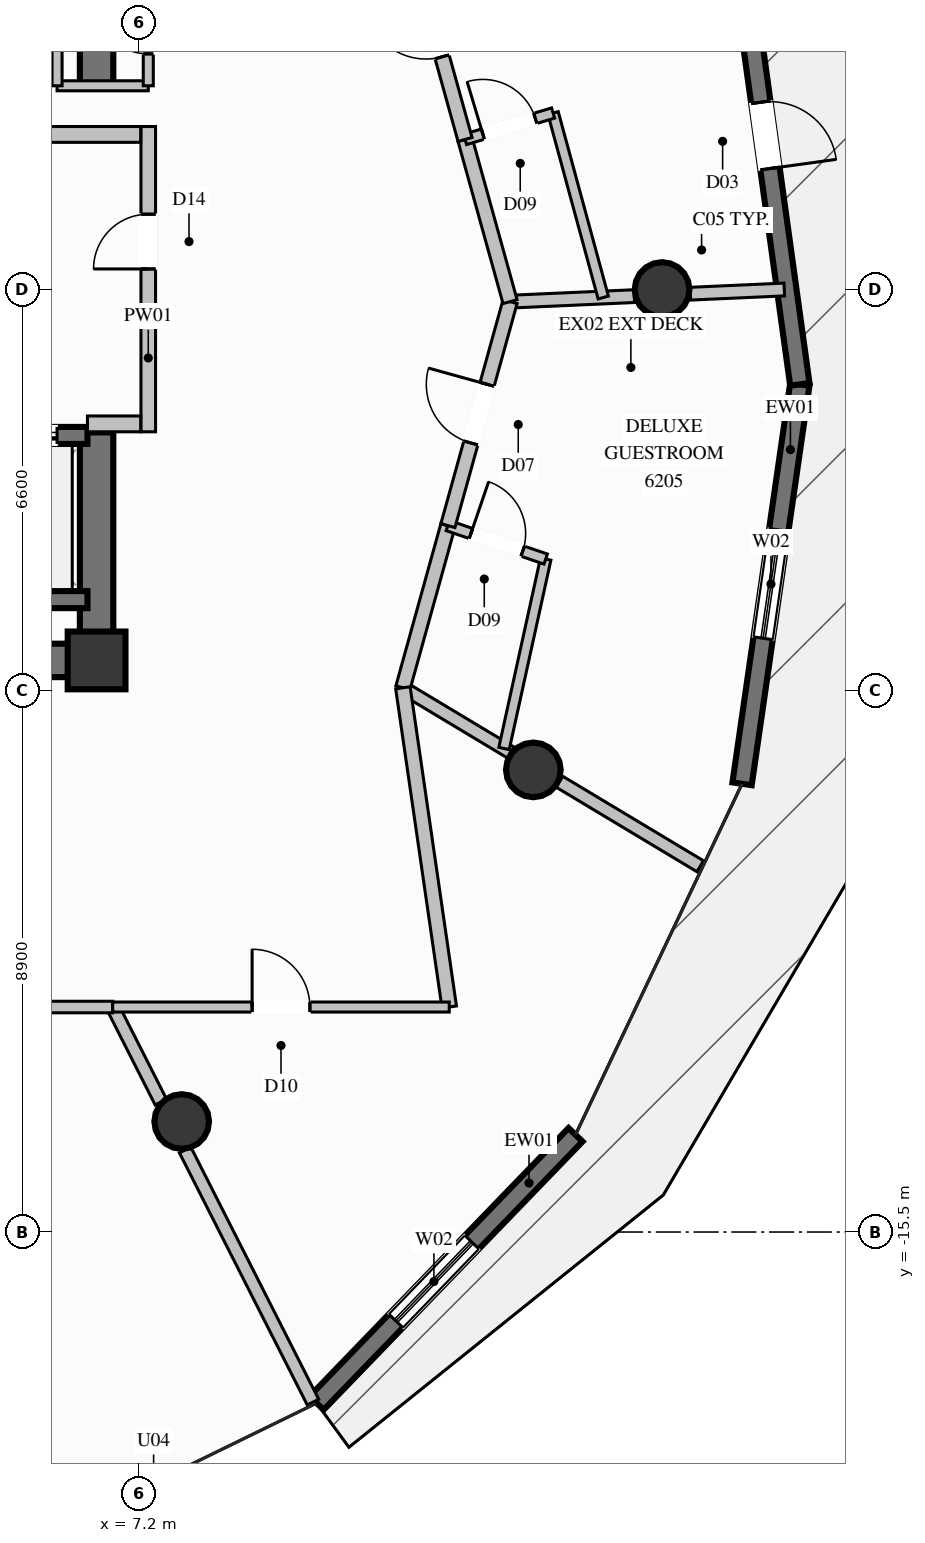
"""IFC4 building model, lengths in metres.
Left out: names, types, materials, properties, quantities, classifications, styles, units other than length and angle.
Written with IfcOpenShell. Run it as: python <this file> out.ifc"""

import sys

from ifc_helpers import new_model, si_unit, direction, frame, frame_2d, origin, origin_2d, place, context, subcontext, project, spatial, rectangle, circle, extrude, element, fill, save


model = new_model("IFC4")
c1 = context("Model", 3, precision=1e-05, world=origin(), true_north=direction((0.0, 1.0)))
c2 = subcontext(c1, "Body", "Model", "MODEL_VIEW")
j1 = project(units=[si_unit("LENGTHUNIT", "METRE"), si_unit("PLANEANGLEUNIT", "RADIAN")], contexts=[c1])
p1 = place(None, origin())
s1 = spatial("IfcSite", under=j1, at=p1, CompositionType="ELEMENT")
p2 = place(p1, origin())
s2 = spatial("IfcBuilding", under=s1, at=p2, CompositionType="ELEMENT")
p3 = place(p2, frame((0.0, 0.0, 230.8)))
s3 = spatial("IfcBuildingStorey", under=s2, at=p3, CompositionType="ELEMENT", Elevation=230.8)
p4 = place(p3, frame((6.5, -6.1, 0.0), z_axis=(0.0, 0.0, 1.0), x_axis=(1.0, 0.0, 0.0)))
e1 = element("IfcColumn", 1, at=p4, inside=s3, PredefinedType="COLUMN", context=c2, shape_type="SweptSolid", body=[
    extrude(rectangle(XDim=0.95, YDim=0.95, at=origin_2d()), origin(), (0.0, 0.0, 1.0), 3.6),
])
p5 = place(p3, frame((4.15, -6.1, 0.0), z_axis=(0.0, 0.0, 1.0), x_axis=(1.0, 0.0, 0.0)))
e2 = element("IfcWall", 2, at=p5, inside=s3, PredefinedType="SHEAR", context=c2, shape_type="SweptSolid", body=[
    extrude(rectangle(XDim=2.075, YDim=0.55, at=frame_2d((1.038, 0.0))), origin(), (0.0, 0.0, 1.0), 3.6),
])
p6 = place(p3, frame((6.5, -6.375, 0.0), z_axis=(0.0, 0.0, 1.0), x_axis=(0.0, 1.0, 0.0)))
e3 = element("IfcWall", 3, at=p6, inside=s3, PredefinedType="SHEAR", context=c2, shape_type="SweptSolid", body=[
    extrude(rectangle(XDim=4.025, YDim=0.55, at=frame_2d((2.012, 0.0))), origin(), (0.0, 0.0, 1.0), 3.6),
])
p7 = place(p3, frame((6.5, 3.35, 0.0), z_axis=(0.0, 0.0, 1.0), x_axis=(0.0, 1.0, 0.0)))
e4 = element("IfcWall", 4, at=p7, inside=s3, PredefinedType="SHEAR", context=c2, shape_type="SweptSolid", body=[
    extrude(rectangle(XDim=3.025, YDim=0.55, at=frame_2d((1.512, 0.0))), origin(), (0.0, 0.0, 1.0), 3.6),
])
for number, where, z_axis, x_axis in (
    (5, (15.8, 0.0, 0.0), (0.0, 0.0, 1.0), (1.0, 0.0, 0.0)),
    (6, (7.9, -13.683, 0.0), (0.0, 0.0, 1.0), (1.0, 0.0, 0.0)),
    (7, (13.683, -7.9, 0.0), (0.0, 0.0, 1.0), (1.0, 0.0, 0.0)),
):
    element("IfcColumn", number, at=place(p3, frame(where, z_axis=z_axis, x_axis=x_axis)), inside=s3, PredefinedType="COLUMN", context=c2, shape_type="SweptSolid", body=[
        extrude(circle(Radius=0.45, at=origin_2d()), origin(), (0.0, 0.0, 1.0), 3.6),
    ])
p8 = place(p3, frame((14.377, -13.901, 0.0), z_axis=(0.0, 0.0, 1.0), x_axis=(-0.694433198018, -0.71955717875, 0.0)))
e8 = element("IfcWall", 8, at=p8, inside=s3, PredefinedType="SOLIDWALL", context=c2, shape_type="SweptSolid", body=[
    extrude(rectangle(XDim=6.132, YDim=0.32, at=frame_2d((3.066, 0.0))), origin(), (0.0, 0.0, 1.0), 3.2),
])
p9 = place(p8, frame((2.454, 0.0, 0.35)))
e9 = element("IfcOpeningElement", 9, at=p9, cuts=e8, PredefinedType="OPENING", context=c2, shape_type="SweptSolid", body=[
    extrude(rectangle(XDim=1.8, YDim=2.6, at=frame_2d((0.9, 1.3))), frame((0.0, 0.17, 0.0), z_axis=(0.0, -1.0, 0.0), x_axis=(1.0, 0.0, 0.0)), (0.0, 0.0, 1.0), 0.34),
])
p10 = place(p3, frame((18.066, -1.56, 0.0), z_axis=(0.0, 0.0, 1.0), x_axis=(-0.143125707186, -0.989704517491, 0.0)))
e10 = element("IfcWall", 10, at=p10, inside=s3, PredefinedType="SOLIDWALL", context=c2, shape_type="SweptSolid", body=[
    extrude(rectangle(XDim=6.637, YDim=0.32, at=frame_2d((3.319, 0.0))), origin(), (0.0, 0.0, 1.0), 3.2),
])
p11 = place(p10, frame((2.419, 0.0, 0.35)))
e11 = element("IfcOpeningElement", 11, at=p11, cuts=e10, PredefinedType="OPENING", context=c2, shape_type="SweptSolid", body=[
    extrude(rectangle(XDim=1.8, YDim=2.6, at=frame_2d((0.9, 1.3))), frame((0.0, 0.17, 0.0), z_axis=(0.0, -1.0, 0.0), x_axis=(1.0, 0.0, 0.0)), (0.0, 0.0, 1.0), 0.34),
])
p12 = place(p3, frame((17.136, 5.161, 0.0), z_axis=(0.0, 0.0, 1.0), x_axis=(0.137057460959, -0.990563098644, 0.0)))
e12 = element("IfcWall", 12, at=p12, inside=s3, PredefinedType="SOLIDWALL", context=c2, shape_type="SweptSolid", body=[
    extrude(rectangle(XDim=6.785, YDim=0.32, at=frame_2d((3.393, 0.0))), origin(), (0.0, 0.0, 1.0), 3.2),
])
p13 = place(p12, frame((2.102, 0.0, 0.0)))
e13 = element("IfcOpeningElement", 13, at=p13, cuts=e12, PredefinedType="OPENING", context=c2, shape_type="SweptSolid", body=[
    extrude(rectangle(XDim=1.1, YDim=2.2, at=frame_2d((0.55, 1.1))), frame((0.0, 0.17, 0.0), z_axis=(0.0, -1.0, 0.0), x_axis=(1.0, 0.0, 0.0)), (0.0, 0.0, 1.0), 0.34),
])
p14 = place(p3, frame((4.15, -5.1, 0.0), z_axis=(0.0, 0.0, 1.0), x_axis=(1.0, 0.0, 0.0)))
e14 = element("IfcWall", 14, at=p14, inside=s3, PredefinedType="SOLIDWALL", context=c2, shape_type="SweptSolid", body=[
    extrude(rectangle(XDim=2.2, YDim=0.28, at=frame_2d((1.1, 0.0))), origin(), (0.0, 0.0, 1.0), 3.2),
])
p15 = place(p3, frame((6.35, -2.4, 0.0), z_axis=(0.0, 0.0, 1.0), x_axis=(-1.0, 0.0, 0.0)))
e15 = element("IfcWall", 15, at=p15, inside=s3, PredefinedType="SOLIDWALL", context=c2, shape_type="SweptSolid", body=[
    extrude(rectangle(XDim=2.2, YDim=0.28, at=frame_2d((1.1, 0.0))), origin(), (0.0, 0.0, 1.0), 3.2),
])
p16 = place(p15, frame((0.5, 0.0, 0.0)))
e16 = element("IfcOpeningElement", 16, at=p16, cuts=e15, PredefinedType="OPENING", context=c2, shape_type="SweptSolid", body=[
    extrude(rectangle(XDim=1.2, YDim=2.2, at=frame_2d((0.6, 1.1))), frame((0.0, 0.15, 0.0), z_axis=(0.0, -1.0, 0.0), x_axis=(1.0, 0.0, 0.0)), (0.0, 0.0, 1.0), 0.3),
])
p17 = place(p3, frame((7.35, -2.34, 0.0), z_axis=(0.0, 0.0, 1.0), x_axis=(0.0, 1.0, 0.0)))
e17 = element("IfcWall", 17, at=p17, inside=s3, PredefinedType="PARTITIONING", context=c2, shape_type="SweptSolid", body=[
    extrude(rectangle(XDim=5.02, YDim=0.24, at=frame_2d((2.51, 0.0))), origin(), (0.0, 0.0, 1.0), 3.2),
])
p18 = place(p17, frame((2.678, 0.0, 0.0)))
e18 = element("IfcOpeningElement", 18, at=p18, cuts=e17, PredefinedType="OPENING", context=c2, shape_type="SweptSolid", body=[
    extrude(rectangle(XDim=0.9, YDim=2.02, at=frame_2d((0.45, 1.01))), frame((0.0, 0.13, 0.0), z_axis=(0.0, -1.0, 0.0), x_axis=(1.0, 0.0, 0.0)), (0.0, 0.0, 1.0), 0.26),
])
p19 = place(p3, frame((6.35, -2.21, 0.0), z_axis=(0.0, 0.0, 1.0), x_axis=(1.0, 0.0, 0.0)))
e19 = element("IfcWall", 19, at=p19, inside=s3, PredefinedType="PARTITIONING", context=c2, shape_type="SweptSolid", body=[
    extrude(rectangle(XDim=0.875, YDim=0.26, at=frame_2d((0.438, 0.0))), origin(), (0.0, 0.0, 1.0), 3.2),
])
p20 = place(p3, frame((4.13, 2.55, 0.0), z_axis=(0.0, 0.0, 1.0), x_axis=(1.0, 0.0, 0.0)))
e20 = element("IfcWall", 20, at=p20, inside=s3, PredefinedType="PARTITIONING", context=c2, shape_type="SweptSolid", body=[
    extrude(rectangle(XDim=3.095, YDim=0.26, at=frame_2d((1.548, 0.0))), origin(), (0.0, 0.0, 1.0), 3.2),
])
p21 = place(p3, frame((5.85, 3.35, 0.0), z_axis=(0.0, 0.0, 1.0), x_axis=(1.0, 0.0, 0.0)))
e21 = element("IfcWall", 21, at=p21, inside=s3, PredefinedType="PARTITIONING", context=c2, shape_type="SweptSolid", body=[
    extrude(rectangle(XDim=1.5, YDim=0.165, at=frame_2d((0.75, 0.0))), origin(), (0.0, 0.0, 1.0), 3.2),
])
p22 = place(p3, frame((7.35, 3.35, 0.0), z_axis=(0.0, 0.0, 1.0), x_axis=(0.0, 1.0, 0.0)))
e22 = element("IfcWall", 22, at=p22, inside=s3, PredefinedType="PARTITIONING", context=c2, shape_type="SweptSolid", body=[
    extrude(rectangle(XDim=1.95, YDim=0.165, at=frame_2d((0.975, 0.0))), origin(), (0.0, 0.0, 1.0), 3.2),
])
p23 = place(p22, frame((0.525, 0.0, 0.0)))
e23 = element("IfcOpeningElement", 23, at=p23, cuts=e22, PredefinedType="OPENING", context=c2, shape_type="SweptSolid", body=[
    extrude(rectangle(XDim=0.9, YDim=2.02, at=frame_2d((0.45, 1.01))), frame((0.0, 0.093, 0.0), z_axis=(0.0, -1.0, 0.0), x_axis=(1.0, 0.0, 0.0)), (0.0, 0.0, 1.0), 0.185),
])
p24 = place(p3, frame((5.85, 5.3, 0.0), z_axis=(0.0, 0.0, 1.0), x_axis=(0.0, -1.0, 0.0)))
e24 = element("IfcWall", 24, at=p24, inside=s3, PredefinedType="PARTITIONING", context=c2, shape_type="SweptSolid", body=[
    extrude(rectangle(XDim=1.95, YDim=0.165, at=frame_2d((0.975, 0.0))), origin(), (0.0, 0.0, 1.0), 2.067),
])
p25 = place(p3, frame((13.3, -0.2, 0.0), z_axis=(0.0, 0.0, 1.0), x_axis=(0.99900803182, 0.044530353235, 0.0)))
e25 = element("IfcWall", 25, at=p25, inside=s3, PredefinedType="PARTITIONING", context=c2, shape_type="SweptSolid", body=[
    extrude(rectangle(XDim=2.045, YDim=0.21, at=frame_2d((1.022, 0.0))), origin(), (0.0, 0.0, 1.0), 2.067),
])
p26 = place(p3, frame((16.265, -0.069, 0.0), z_axis=(0.0, 0.0, 1.0), x_axis=(0.99900178974, 0.04467017009, 0.0)))
e26 = element("IfcWall", 26, at=p26, inside=s3, PredefinedType="PARTITIONING", context=c2, shape_type="SweptSolid", body=[
    extrude(rectangle(XDim=1.547, YDim=0.21, at=frame_2d((0.773, 0.0))), origin(), (0.0, 0.0, 1.0), 3.2),
])
p27 = place(p3, frame((11.538, -6.55, 0.0), z_axis=(0.0, 0.0, 1.0), x_axis=(0.857326120852, -0.514773661432, 0.0)))
e27 = element("IfcWall", 27, at=p27, inside=s3, PredefinedType="PARTITIONING", context=c2, shape_type="SweptSolid", body=[
    extrude(rectangle(XDim=2.067, YDim=0.21, at=frame_2d((1.033, 0.0))), origin(), (0.0, 0.0, 1.0), 2.067),
])
p28 = place(p3, frame((14.111, -8.094, 0.0), z_axis=(0.0, 0.0, 1.0), x_axis=(0.857333459741, -0.514761438736, 0.0)))
e28 = element("IfcWall", 28, at=p28, inside=s3, PredefinedType="PARTITIONING", context=c2, shape_type="SweptSolid", body=[
    extrude(rectangle(XDim=2.702, YDim=0.21, at=frame_2d((1.351, 0.0))), origin(), (0.0, 0.0, 1.0), 3.2),
])
p29 = place(p3, frame((11.538, -6.55, 0.0), z_axis=(0.0, 0.0, 1.0), x_axis=(0.267361785392, 0.963596220266, 0.0)))
e29 = element("IfcWall", 29, at=p29, inside=s3, PredefinedType="PARTITIONING", context=c2, shape_type="SweptSolid", body=[
    extrude(rectangle(XDim=2.768, YDim=0.24, at=frame_2d((1.384, 0.0))), origin(), (0.0, 0.0, 1.0), 3.2),
])
p30 = place(p3, frame((13.201, -7.548, 0.0), z_axis=(0.0, 0.0, 1.0), x_axis=(0.214790229416, 0.976660205674, 0.0)))
e30 = element("IfcWall", 30, at=p30, inside=s3, PredefinedType="PLUMBINGWALL", context=c2, shape_type="SweptSolid", body=[
    extrude(rectangle(XDim=3.189, YDim=0.175, at=frame_2d((1.595, 0.0))), origin(), (0.0, 0.0, 1.0), 2.769),
])
p31 = place(p3, frame((12.278, -3.883, 0.0), z_axis=(0.0, 0.0, 1.0), x_axis=(0.946168616294, -0.323674140982, 0.0)))
e31 = element("IfcWall", 31, at=p31, inside=s3, PredefinedType="PLUMBINGWALL", context=c2, shape_type="SweptSolid", body=[
    extrude(rectangle(XDim=1.699, YDim=0.175, at=frame_2d((0.85, 0.0))), origin(), (0.0, 0.0, 1.0), 3.2),
])
p32 = place(p31, frame((0.4, 0.0, 0.0)))
e32 = element("IfcOpeningElement", 32, at=p32, cuts=e31, PredefinedType="OPENING", context=c2, shape_type="SweptSolid", body=[
    extrude(rectangle(XDim=0.9, YDim=2.1, at=frame_2d((0.45, 1.05))), frame((0.0, 0.098, 0.0), z_axis=(0.0, -1.0, 0.0), x_axis=(1.0, 0.0, 0.0)), (0.0, 0.0, 1.0), 0.195),
])
p33 = place(p3, frame((12.278, -3.883, 0.0), z_axis=(0.0, 0.0, 1.0), x_axis=(0.267373718537, 0.963592909187, 0.0)))
e33 = element("IfcWall", 33, at=p33, inside=s3, PredefinedType="PARTITIONING", context=c2, shape_type="SweptSolid", body=[
    extrude(rectangle(XDim=3.822, YDim=0.24, at=frame_2d((1.911, 0.0))), origin(), (0.0, 0.0, 1.0), 3.2),
])
p34 = place(p33, frame((1.411, 0.0, 0.0)))
e34 = element("IfcOpeningElement", 34, at=p34, cuts=e33, PredefinedType="OPENING", context=c2, shape_type="SweptSolid", body=[
    extrude(rectangle(XDim=1.0, YDim=2.2, at=frame_2d((0.5, 1.1))), frame((0.0, 0.13, 0.0), z_axis=(0.0, -1.0, 0.0), x_axis=(1.0, 0.0, 0.0)), (0.0, 0.0, 1.0), 0.26),
])
p35 = place(p3, frame((13.3, -0.2, 0.0), z_axis=(0.0, 0.0, 1.0), x_axis=(-0.267361785392, 0.963596220266, 0.0)))
e35 = element("IfcWall", 35, at=p35, inside=s3, PredefinedType="PARTITIONING", context=c2, shape_type="SweptSolid", body=[
    extrude(rectangle(XDim=2.768, YDim=0.24, at=frame_2d((1.384, 0.0))), origin(), (0.0, 0.0, 1.0), 3.2),
])
p36 = place(p3, frame((14.833, -0.132, 0.0), z_axis=(0.0, 0.0, 1.0), x_axis=(-0.262361781469, 0.964969582746, 0.0)))
e36 = element("IfcWall", 36, at=p36, inside=s3, PredefinedType="PLUMBINGWALL", context=c2, shape_type="SweptSolid", body=[
    extrude(rectangle(XDim=3.144, YDim=0.175, at=frame_2d((1.572, 0.0))), origin(), (0.0, 0.0, 1.0), 3.2),
])
p37 = place(p3, frame((12.56, 2.467, 0.0), z_axis=(0.0, 0.0, 1.0), x_axis=(0.957706206775, 0.287747843614, 0.0)))
e37 = element("IfcWall", 37, at=p37, inside=s3, PredefinedType="PLUMBINGWALL", context=c2, shape_type="SweptSolid", body=[
    extrude(rectangle(XDim=1.512, YDim=0.175, at=frame_2d((0.756, 0.0))), origin(), (0.0, 0.0, 1.0), 3.2),
])
p38 = place(p37, frame((0.306, 0.0, 0.0)))
e38 = element("IfcOpeningElement", 38, at=p38, cuts=e37, PredefinedType="OPENING", context=c2, shape_type="SweptSolid", body=[
    extrude(rectangle(XDim=0.9, YDim=2.1, at=frame_2d((0.45, 1.05))), frame((0.0, 0.098, 0.0), z_axis=(0.0, -1.0, 0.0), x_axis=(1.0, 0.0, 0.0)), (0.0, 0.0, 1.0), 0.195),
])
p39 = place(p3, frame((12.56, 2.467, 0.0), z_axis=(0.0, 0.0, 1.0), x_axis=(-0.267390175797, 0.963588342544, 0.0)))
e39 = element("IfcWall", 39, at=p39, inside=s3, PredefinedType="PARTITIONING", context=c2, shape_type="SweptSolid", body=[
    extrude(rectangle(XDim=3.822, YDim=0.24, at=frame_2d((1.911, 0.0))), origin(), (0.0, 0.0, 1.0), 3.2),
])
p40 = place(p39, frame((1.411, 0.0, 0.0)))
e40 = element("IfcOpeningElement", 40, at=p40, cuts=e39, PredefinedType="OPENING", context=c2, shape_type="SweptSolid", body=[
    extrude(rectangle(XDim=1.0, YDim=2.2, at=frame_2d((0.5, 1.1))), frame((0.0, 0.13, 0.0), z_axis=(0.0, -1.0, 0.0), x_axis=(1.0, 0.0, 0.0)), (0.0, 0.0, 1.0), 0.26),
])
p41 = place(p3, frame((6.765, -11.8, 0.0), z_axis=(0.0, 0.0, 1.0), x_axis=(0.452225083285, -0.891903847983, 0.0)))
e41 = element("IfcWall", 41, at=p41, inside=s3, PredefinedType="PARTITIONING", context=c2, shape_type="SweptSolid", body=[
    extrude(rectangle(XDim=1.751, YDim=0.21, at=frame_2d((0.875, 0.0))), origin(), (0.0, 0.0, 1.0), 2.067),
])
p42 = place(p3, frame((7.956, -14.15, 0.0), z_axis=(0.0, 0.0, 1.0), x_axis=(0.45218310231, -0.8919251325, 0.0)))
e42 = element("IfcWall", 42, at=p42, inside=s3, PredefinedType="PARTITIONING", context=c2, shape_type="SweptSolid", body=[
    extrude(rectangle(XDim=4.651, YDim=0.21, at=frame_2d((2.325, 0.0))), origin(), (0.0, 0.0, 1.0), 3.2),
])
p43 = place(p3, frame((0.0, -11.8, 0.0), z_axis=(0.0, 0.0, 1.0), x_axis=(1.0, 0.0, 0.0)))
e43 = element("IfcWall", 43, at=p43, inside=s3, PredefinedType="PARTITIONING", context=c2, shape_type="SweptSolid", body=[
    extrude(rectangle(XDim=6.765, YDim=0.19, at=frame_2d((3.382, 0.0))), origin(), (0.0, 0.0, 1.0), 3.2),
])
p44 = place(p43, frame((2.907, 0.0, 0.0)))
e44 = element("IfcOpeningElement", 44, at=p44, cuts=e43, PredefinedType="OPENING", context=c2, shape_type="SweptSolid", body=[
    extrude(rectangle(XDim=0.95, YDim=2.1, at=frame_2d((0.475, 1.05))), frame((0.0, 0.105, 0.0), z_axis=(0.0, -1.0, 0.0), x_axis=(1.0, 0.0, 0.0)), (0.0, 0.0, 1.0), 0.21),
])
p45 = place(p3, frame((12.3, -11.8, 0.0), z_axis=(0.0, 0.0, 1.0), x_axis=(-0.143630922764, 0.989631324295, 0.0)))
e45 = element("IfcWall", 45, at=p45, inside=s3, PredefinedType="PARTITIONING", context=c2, shape_type="SweptSolid", body=[
    extrude(rectangle(XDim=5.305, YDim=0.24, at=frame_2d((2.652, 0.0))), origin(), (0.0, 0.0, 1.0), 3.2),
])
p46 = place(p3, frame((6.765, -11.8, 0.0), z_axis=(0.0, 0.0, 1.0), x_axis=(1.0, 0.0, 0.0)))
e46 = element("IfcWall", 46, at=p46, inside=s3, PredefinedType="PARTITIONING", context=c2, shape_type="SweptSolid", body=[
    extrude(rectangle(XDim=5.535, YDim=0.165, at=frame_2d((2.768, 0.0))), origin(), (0.0, 0.0, 1.0), 3.2),
])
p47 = place(p46, frame((2.293, 0.0, 0.0)))
e47 = element("IfcOpeningElement", 47, at=p47, cuts=e46, PredefinedType="OPENING", context=c2, shape_type="SweptSolid", body=[
    extrude(rectangle(XDim=0.95, YDim=2.1, at=frame_2d((0.475, 1.05))), frame((0.0, 0.093, 0.0), z_axis=(0.0, -1.0, 0.0), x_axis=(1.0, 0.0, 0.0)), (0.0, 0.0, 1.0), 0.185),
])
p48 = place(p9, origin())
e48 = element("IfcWindow", 48, at=p48, inside=s3, PartitioningType="SINGLE_PANEL", PredefinedType="WINDOW", context=c2, shape_type="SweptSolid", body=[
    extrude(rectangle(XDim=1.8, YDim=2.6, at=frame_2d((0.9, 1.3))), frame((0.0, 0.03, 0.0), z_axis=(0.0, -1.0, 0.0), x_axis=(1.0, 0.0, 0.0)), (0.0, 0.0, 1.0), 0.06),
])
fill(e9, e48)
p49 = place(p11, origin())
e49 = element("IfcWindow", 49, at=p49, inside=s3, PartitioningType="SINGLE_PANEL", PredefinedType="WINDOW", context=c2, shape_type="SweptSolid", body=[
    extrude(rectangle(XDim=1.8, YDim=2.6, at=frame_2d((0.9, 1.3))), frame((0.0, 0.03, 0.0), z_axis=(0.0, -1.0, 0.0), x_axis=(1.0, 0.0, 0.0)), (0.0, 0.0, 1.0), 0.06),
])
fill(e11, e49)
p50 = place(p13, origin())
e50 = element("IfcDoor", 50, at=p50, inside=s3, OperationType="SINGLE_SWING_RIGHT", PredefinedType="DOOR", context=c2, shape_type="SweptSolid", body=[
    extrude(rectangle(XDim=1.1, YDim=2.2, at=frame_2d((0.55, 1.1))), frame((0.0, 0.025, 0.0), z_axis=(0.0, -1.0, 0.0), x_axis=(1.0, 0.0, 0.0)), (0.0, 0.0, 1.0), 0.05),
])
fill(e13, e50)
p51 = place(p16, origin())
e51 = element("IfcDoor", 51, at=p51, inside=s3, OperationType="SLIDING_TO_LEFT", PredefinedType="DOOR", context=c2, shape_type="SweptSolid", body=[
    extrude(rectangle(XDim=1.2, YDim=2.2, at=frame_2d((0.6, 1.1))), frame((0.0, 0.025, 0.0), z_axis=(0.0, -1.0, 0.0), x_axis=(1.0, 0.0, 0.0)), (0.0, 0.0, 1.0), 0.05),
])
fill(e16, e51)
p52 = place(p18, origin())
e52 = element("IfcDoor", 52, at=p52, inside=s3, OperationType="SINGLE_SWING_LEFT", PredefinedType="DOOR", context=c2, shape_type="SweptSolid", body=[
    extrude(rectangle(XDim=0.9, YDim=2.02, at=frame_2d((0.45, 1.01))), frame((0.0, 0.025, 0.0), z_axis=(0.0, -1.0, 0.0), x_axis=(1.0, 0.0, 0.0)), (0.0, 0.0, 1.0), 0.05),
])
fill(e18, e52)
p53 = place(p23, origin())
e53 = element("IfcDoor", 53, at=p53, inside=s3, OperationType="SINGLE_SWING_RIGHT", PredefinedType="DOOR", context=c2, shape_type="SweptSolid", body=[
    extrude(rectangle(XDim=0.9, YDim=2.02, at=frame_2d((0.45, 1.01))), frame((0.0, 0.025, 0.0), z_axis=(0.0, -1.0, 0.0), x_axis=(1.0, 0.0, 0.0)), (0.0, 0.0, 1.0), 0.05),
])
fill(e23, e53)
p54 = place(p32, origin())
e54 = element("IfcDoor", 54, at=p54, inside=s3, OperationType="SINGLE_SWING_LEFT", PredefinedType="DOOR", context=c2, shape_type="SweptSolid", body=[
    extrude(rectangle(XDim=0.9, YDim=2.1, at=frame_2d((0.45, 1.05))), frame((0.0, 0.025, 0.0), z_axis=(0.0, -1.0, 0.0), x_axis=(1.0, 0.0, 0.0)), (0.0, 0.0, 1.0), 0.05),
])
fill(e32, e54)
p55 = place(p34, origin())
e55 = element("IfcDoor", 55, at=p55, inside=s3, OperationType="SINGLE_SWING_RIGHT", PredefinedType="DOOR", context=c2, shape_type="SweptSolid", body=[
    extrude(rectangle(XDim=1.0, YDim=2.2, at=frame_2d((0.5, 1.1))), frame((0.0, 0.025, 0.0), z_axis=(0.0, -1.0, 0.0), x_axis=(1.0, 0.0, 0.0)), (0.0, 0.0, 1.0), 0.05),
])
fill(e34, e55)
p56 = place(p38, origin())
e56 = element("IfcDoor", 56, at=p56, inside=s3, OperationType="SINGLE_SWING_LEFT", PredefinedType="DOOR", context=c2, shape_type="SweptSolid", body=[
    extrude(rectangle(XDim=0.9, YDim=2.1, at=frame_2d((0.45, 1.05))), frame((0.0, 0.025, 0.0), z_axis=(0.0, -1.0, 0.0), x_axis=(1.0, 0.0, 0.0)), (0.0, 0.0, 1.0), 0.05),
])
fill(e38, e56)
p57 = place(p40, origin())
e57 = element("IfcDoor", 57, at=p57, inside=s3, OperationType="SINGLE_SWING_RIGHT", PredefinedType="DOOR", context=c2, shape_type="SweptSolid", body=[
    extrude(rectangle(XDim=1.0, YDim=2.2, at=frame_2d((0.5, 1.1))), frame((0.0, 0.025, 0.0), z_axis=(0.0, -1.0, 0.0), x_axis=(1.0, 0.0, 0.0)), (0.0, 0.0, 1.0), 0.05),
])
fill(e40, e57)
p58 = place(p47, origin())
e58 = element("IfcDoor", 58, at=p58, inside=s3, OperationType="SINGLE_SWING_LEFT", PredefinedType="DOOR", context=c2, shape_type="SweptSolid", body=[
    extrude(rectangle(XDim=0.95, YDim=2.1, at=frame_2d((0.475, 1.05))), frame((0.0, 0.025, 0.0), z_axis=(0.0, -1.0, 0.0), x_axis=(1.0, 0.0, 0.0)), (0.0, 0.0, 1.0), 0.05),
])
fill(e47, e58)
save(model, sys.argv[1])
